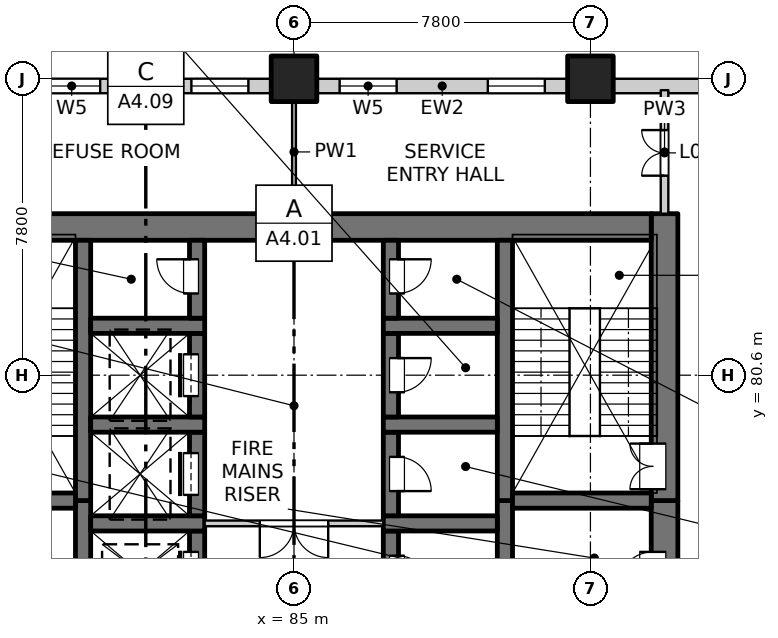
"""IFC4 building model, lengths in metres.
Left out: names, types, materials, properties, quantities, classifications, styles, units other than length and angle.
Written with IfcOpenShell. Run it as: python <this file> out.ifc"""

import sys

from ifc_helpers import new_model, si_unit, direction, frame, frame_2d, origin, origin_2d, place, context, subcontext, project, spatial, rectangle, extrude, element, fill, save


model = new_model("IFC4")
c1 = context("Model", 3, precision=1e-05, world=origin(), true_north=direction((0.0, 1.0)))
c2 = subcontext(c1, "Body", "Model", "MODEL_VIEW")
j1 = project(units=[si_unit("LENGTHUNIT", "METRE"), si_unit("PLANEANGLEUNIT", "RADIAN")], contexts=[c1])
p1 = place(None, origin())
s1 = spatial("IfcSite", under=j1, at=p1, CompositionType="ELEMENT")
p2 = place(p1, origin())
s2 = spatial("IfcBuilding", under=s1, at=p2, CompositionType="ELEMENT")
p3 = place(p2, frame((0.0, 0.0, 6.0)))
s3 = spatial("IfcBuildingStorey", under=s2, at=p3, CompositionType="ELEMENT", Elevation=6.0)
for number, where, z_axis, x_axis in (
    (1, (85.0, 88.4, -0.3), (0.0, 0.0, 1.0), (1.0, 0.0, 0.0)),
    (2, (92.8, 88.4, -0.3), (0.0, 0.0, 1.0), (1.0, 0.0, 0.0)),
):
    element("IfcColumn", number, at=place(p3, frame(where, z_axis=z_axis, x_axis=x_axis)), inside=s3, PredefinedType="COLUMN", context=c2, shape_type="SweptSolid", body=[
        extrude(rectangle(XDim=1.2, YDim=1.2, at=origin_2d()), origin(), (0.0, 0.0, 1.0), 4.5),
    ])
p4 = place(p3, frame((94.75, 61.95, -0.3), z_axis=(0.0, 0.0, 1.0), x_axis=(0.0, 1.0, 0.0)))
e3 = element("IfcWall", 3, at=p4, inside=s3, PredefinedType="SOLIDWALL", context=c2, shape_type="SweptSolid", body=[
    extrude(rectangle(XDim=15.35, YDim=0.7, at=frame_2d((7.675, 0.0))), origin(), (0.0, 0.0, 1.0), 4.5),
])
p5 = place(p4, frame((0.925, 0.0, 0.3)))
e4 = element("IfcOpeningElement", 4, at=p5, cuts=e3, PredefinedType="OPENING", context=c2, shape_type="SweptSolid", body=[
    extrude(rectangle(XDim=0.9, YDim=2.1, at=frame_2d((0.45, 1.05))), frame((0.0, 0.36, 0.0), z_axis=(0.0, -1.0, 0.0), x_axis=(1.0, 0.0, 0.0)), (0.0, 0.0, 1.0), 0.72),
])
p6 = place(p4, frame((6.8, 0.0, 0.3)))
e5 = element("IfcOpeningElement", 5, at=p6, cuts=e3, PredefinedType="OPENING", context=c2, shape_type="SweptSolid", body=[
    extrude(rectangle(XDim=0.9, YDim=2.1, at=frame_2d((0.45, 1.05))), frame((0.0, 0.36, 0.0), z_axis=(0.0, -1.0, 0.0), x_axis=(1.0, 0.0, 0.0)), (0.0, 0.0, 1.0), 0.72),
])
p7 = place(p4, frame((13.1, 0.0, 0.3)))
e6 = element("IfcOpeningElement", 6, at=p7, cuts=e3, PredefinedType="OPENING", context=c2, shape_type="SweptSolid", body=[
    extrude(rectangle(XDim=0.9, YDim=2.1, at=frame_2d((0.45, 1.05))), frame((0.0, 0.36, 0.0), z_axis=(0.0, -1.0, 0.0), x_axis=(1.0, 0.0, 0.0)), (0.0, 0.0, 1.0), 0.72),
])
p8 = place(p3, frame((94.75, 77.3, -0.3), z_axis=(0.0, 0.0, 1.0), x_axis=(0.0, 1.0, 0.0)))
e7 = element("IfcWall", 7, at=p8, inside=s3, PredefinedType="SOLIDWALL", context=c2, shape_type="SweptSolid", body=[
    extrude(rectangle(XDim=7.55, YDim=0.7, at=frame_2d((3.775, 0.0))), origin(), (0.0, 0.0, 1.0), 4.5),
])
p9 = place(p8, frame((0.3, 0.0, 0.3)))
e8 = element("IfcOpeningElement", 8, at=p9, cuts=e7, PredefinedType="OPENING", context=c2, shape_type="SweptSolid", body=[
    extrude(rectangle(XDim=1.2, YDim=2.1, at=frame_2d((0.6, 1.05))), frame((0.0, 0.36, 0.0), z_axis=(0.0, -1.0, 0.0), x_axis=(1.0, 0.0, 0.0)), (0.0, 0.0, 1.0), 0.72),
])
p10 = place(p3, frame((75.6, 84.5, -0.3), z_axis=(0.0, 0.0, 1.0), x_axis=(1.0, 0.0, 0.0)))
e9 = element("IfcWall", 9, at=p10, inside=s3, PredefinedType="SOLIDWALL", context=c2, shape_type="SweptSolid", body=[
    extrude(rectangle(XDim=18.8, YDim=0.7, at=frame_2d((9.4, 0.0))), origin(), (0.0, 0.0, 1.0), 4.5),
])
p11 = place(p3, frame((79.45, 60.9, -0.3), z_axis=(0.0, 0.0, 1.0), x_axis=(0.0, 1.0, 0.0)))
e10 = element("IfcWall", 10, at=p11, inside=s3, PredefinedType="SOLIDWALL", context=c2, shape_type="SweptSolid", body=[
    extrude(rectangle(XDim=16.4, YDim=0.4, at=frame_2d((8.2, 0.0))), origin(), (0.0, 0.0, 1.0), 4.5),
])
p12 = place(p3, frame((79.45, 77.3, -0.3), z_axis=(0.0, 0.0, 1.0), x_axis=(0.0, 1.0, 0.0)))
e11 = element("IfcWall", 11, at=p12, inside=s3, PredefinedType="SOLIDWALL", context=c2, shape_type="SweptSolid", body=[
    extrude(rectangle(XDim=6.85, YDim=0.4, at=frame_2d((3.425, 0.0))), origin(), (0.0, 0.0, 1.0), 4.5),
])
p13 = place(p3, frame((90.55, 61.95, -0.3), z_axis=(0.0, 0.0, 1.0), x_axis=(0.0, 1.0, 0.0)))
e12 = element("IfcWall", 12, at=p13, inside=s3, PredefinedType="SOLIDWALL", context=c2, shape_type="SweptSolid", body=[
    extrude(rectangle(XDim=15.35, YDim=0.4, at=frame_2d((7.675, 0.0))), origin(), (0.0, 0.0, 1.0), 4.5),
])
p14 = place(p3, frame((90.55, 77.3, -0.3), z_axis=(0.0, 0.0, 1.0), x_axis=(0.0, 1.0, 0.0)))
e13 = element("IfcWall", 13, at=p14, inside=s3, PredefinedType="SOLIDWALL", context=c2, shape_type="SweptSolid", body=[
    extrude(rectangle(XDim=6.85, YDim=0.4, at=frame_2d((3.425, 0.0))), origin(), (0.0, 0.0, 1.0), 4.5),
])
p15 = place(p3, frame((82.45, 74.3, -0.3), z_axis=(0.0, 0.0, 1.0), x_axis=(0.0, 1.0, 0.0)))
e14 = element("IfcWall", 14, at=p15, inside=s3, PredefinedType="SOLIDWALL", context=c2, shape_type="SweptSolid", body=[
    extrude(rectangle(XDim=2.2, YDim=0.4, at=frame_2d((1.1, 0.0))), origin(), (0.0, 0.0, 1.0), 4.5),
])
p16 = place(p15, frame((0.55, 0.0, 0.3)))
e15 = element("IfcOpeningElement", 15, at=p16, cuts=e14, PredefinedType="OPENING", context=c2, shape_type="SweptSolid", body=[
    extrude(rectangle(XDim=1.1, YDim=2.1, at=frame_2d((0.55, 1.05))), frame((0.0, 0.21, 0.0), z_axis=(0.0, -1.0, 0.0), x_axis=(1.0, 0.0, 0.0)), (0.0, 0.0, 1.0), 0.42),
])
p17 = place(p3, frame((79.65, 76.7, -0.3), z_axis=(0.0, 0.0, 1.0), x_axis=(1.0, 0.0, 0.0)))
e16 = element("IfcWall", 16, at=p17, inside=s3, PredefinedType="SOLIDWALL", context=c2, shape_type="SweptSolid", body=[
    extrude(rectangle(XDim=3.0, YDim=0.4, at=frame_2d((1.5, 0.0))), origin(), (0.0, 0.0, 1.0), 4.5),
])
p18 = place(p3, frame((82.45, 76.9, -0.3), z_axis=(0.0, 0.0, 1.0), x_axis=(0.0, 1.0, 0.0)))
e17 = element("IfcWall", 17, at=p18, inside=s3, PredefinedType="SOLIDWALL", context=c2, shape_type="SweptSolid", body=[
    extrude(rectangle(XDim=2.2, YDim=0.4, at=frame_2d((1.1, 0.0))), origin(), (0.0, 0.0, 1.0), 4.5),
])
p19 = place(p18, frame((0.55, 0.0, 0.3)))
e18 = element("IfcOpeningElement", 18, at=p19, cuts=e17, PredefinedType="OPENING", context=c2, shape_type="SweptSolid", body=[
    extrude(rectangle(XDim=1.1, YDim=2.1, at=frame_2d((0.55, 1.05))), frame((0.0, 0.21, 0.0), z_axis=(0.0, -1.0, 0.0), x_axis=(1.0, 0.0, 0.0)), (0.0, 0.0, 1.0), 0.42),
])
p20 = place(p3, frame((79.65, 79.3, -0.3), z_axis=(0.0, 0.0, 1.0), x_axis=(1.0, 0.0, 0.0)))
e19 = element("IfcWall", 19, at=p20, inside=s3, PredefinedType="SOLIDWALL", context=c2, shape_type="SweptSolid", body=[
    extrude(rectangle(XDim=3.0, YDim=0.4, at=frame_2d((1.5, 0.0))), origin(), (0.0, 0.0, 1.0), 4.5),
])
p21 = place(p3, frame((82.45, 79.5, -0.3), z_axis=(0.0, 0.0, 1.0), x_axis=(0.0, 1.0, 0.0)))
e20 = element("IfcWall", 20, at=p21, inside=s3, PredefinedType="SOLIDWALL", context=c2, shape_type="SweptSolid", body=[
    extrude(rectangle(XDim=2.2, YDim=0.4, at=frame_2d((1.1, 0.0))), origin(), (0.0, 0.0, 1.0), 4.5),
])
p22 = place(p21, frame((0.55, 0.0, 0.3)))
e21 = element("IfcOpeningElement", 21, at=p22, cuts=e20, PredefinedType="OPENING", context=c2, shape_type="SweptSolid", body=[
    extrude(rectangle(XDim=1.1, YDim=2.1, at=frame_2d((0.55, 1.05))), frame((0.0, 0.21, 0.0), z_axis=(0.0, -1.0, 0.0), x_axis=(1.0, 0.0, 0.0)), (0.0, 0.0, 1.0), 0.42),
])
p23 = place(p3, frame((79.65, 81.9, -0.3), z_axis=(0.0, 0.0, 1.0), x_axis=(1.0, 0.0, 0.0)))
e22 = element("IfcWall", 22, at=p23, inside=s3, PredefinedType="SOLIDWALL", context=c2, shape_type="SweptSolid", body=[
    extrude(rectangle(XDim=3.0, YDim=0.4, at=frame_2d((1.5, 0.0))), origin(), (0.0, 0.0, 1.0), 4.5),
])
p24 = place(p3, frame((82.45, 82.1, -0.3), z_axis=(0.0, 0.0, 1.0), x_axis=(0.0, 1.0, 0.0)))
e23 = element("IfcWall", 23, at=p24, inside=s3, PredefinedType="SOLIDWALL", context=c2, shape_type="SweptSolid", body=[
    extrude(rectangle(XDim=2.05, YDim=0.4, at=frame_2d((1.025, 0.0))), origin(), (0.0, 0.0, 1.0), 4.5),
])
p25 = place(p24, frame((0.65, 0.0, 0.3)))
e24 = element("IfcOpeningElement", 24, at=p25, cuts=e23, PredefinedType="OPENING", context=c2, shape_type="SweptSolid", body=[
    extrude(rectangle(XDim=0.9, YDim=2.1, at=frame_2d((0.45, 1.05))), frame((0.0, 0.21, 0.0), z_axis=(0.0, -1.0, 0.0), x_axis=(1.0, 0.0, 0.0)), (0.0, 0.0, 1.0), 0.42),
])
p26 = place(p3, frame((87.55, 74.3, -0.3), z_axis=(0.0, 0.0, 1.0), x_axis=(0.0, 1.0, 0.0)))
e25 = element("IfcWall", 25, at=p26, inside=s3, PredefinedType="SOLIDWALL", context=c2, shape_type="SweptSolid", body=[
    extrude(rectangle(XDim=2.2, YDim=0.4, at=frame_2d((1.1, 0.0))), origin(), (0.0, 0.0, 1.0), 4.5),
])
p27 = place(p26, frame((0.65, 0.0, 0.3)))
e26 = element("IfcOpeningElement", 26, at=p27, cuts=e25, PredefinedType="OPENING", context=c2, shape_type="SweptSolid", body=[
    extrude(rectangle(XDim=0.9, YDim=2.1, at=frame_2d((0.45, 1.05))), frame((0.0, 0.21, 0.0), z_axis=(0.0, -1.0, 0.0), x_axis=(1.0, 0.0, 0.0)), (0.0, 0.0, 1.0), 0.42),
])
p28 = place(p3, frame((87.35, 76.7, -0.3), z_axis=(0.0, 0.0, 1.0), x_axis=(1.0, 0.0, 0.0)))
e27 = element("IfcWall", 27, at=p28, inside=s3, PredefinedType="SOLIDWALL", context=c2, shape_type="SweptSolid", body=[
    extrude(rectangle(XDim=3.0, YDim=0.4, at=frame_2d((1.5, 0.0))), origin(), (0.0, 0.0, 1.0), 4.5),
])
p29 = place(p3, frame((87.55, 76.9, -0.3), z_axis=(0.0, 0.0, 1.0), x_axis=(0.0, 1.0, 0.0)))
e28 = element("IfcWall", 28, at=p29, inside=s3, PredefinedType="SOLIDWALL", context=c2, shape_type="SweptSolid", body=[
    extrude(rectangle(XDim=2.2, YDim=0.4, at=frame_2d((1.1, 0.0))), origin(), (0.0, 0.0, 1.0), 4.5),
])
p30 = place(p29, frame((0.65, 0.0, 0.3)))
e29 = element("IfcOpeningElement", 29, at=p30, cuts=e28, PredefinedType="OPENING", context=c2, shape_type="SweptSolid", body=[
    extrude(rectangle(XDim=0.9, YDim=2.1, at=frame_2d((0.45, 1.05))), frame((0.0, 0.21, 0.0), z_axis=(0.0, -1.0, 0.0), x_axis=(1.0, 0.0, 0.0)), (0.0, 0.0, 1.0), 0.42),
])
p31 = place(p3, frame((87.35, 79.3, -0.3), z_axis=(0.0, 0.0, 1.0), x_axis=(1.0, 0.0, 0.0)))
e30 = element("IfcWall", 30, at=p31, inside=s3, PredefinedType="SOLIDWALL", context=c2, shape_type="SweptSolid", body=[
    extrude(rectangle(XDim=3.0, YDim=0.4, at=frame_2d((1.5, 0.0))), origin(), (0.0, 0.0, 1.0), 4.5),
])
p32 = place(p3, frame((87.55, 79.5, -0.3), z_axis=(0.0, 0.0, 1.0), x_axis=(0.0, 1.0, 0.0)))
e31 = element("IfcWall", 31, at=p32, inside=s3, PredefinedType="SOLIDWALL", context=c2, shape_type="SweptSolid", body=[
    extrude(rectangle(XDim=2.2, YDim=0.4, at=frame_2d((1.1, 0.0))), origin(), (0.0, 0.0, 1.0), 4.5),
])
p33 = place(p32, frame((0.65, 0.0, 0.3)))
e32 = element("IfcOpeningElement", 32, at=p33, cuts=e31, PredefinedType="OPENING", context=c2, shape_type="SweptSolid", body=[
    extrude(rectangle(XDim=0.9, YDim=2.1, at=frame_2d((0.45, 1.05))), frame((0.0, 0.21, 0.0), z_axis=(0.0, -1.0, 0.0), x_axis=(1.0, 0.0, 0.0)), (0.0, 0.0, 1.0), 0.42),
])
p34 = place(p3, frame((87.35, 81.9, -0.3), z_axis=(0.0, 0.0, 1.0), x_axis=(1.0, 0.0, 0.0)))
e33 = element("IfcWall", 33, at=p34, inside=s3, PredefinedType="SOLIDWALL", context=c2, shape_type="SweptSolid", body=[
    extrude(rectangle(XDim=3.0, YDim=0.4, at=frame_2d((1.5, 0.0))), origin(), (0.0, 0.0, 1.0), 4.5),
])
p35 = place(p3, frame((87.55, 82.1, -0.3), z_axis=(0.0, 0.0, 1.0), x_axis=(0.0, 1.0, 0.0)))
e34 = element("IfcWall", 34, at=p35, inside=s3, PredefinedType="SOLIDWALL", context=c2, shape_type="SweptSolid", body=[
    extrude(rectangle(XDim=2.05, YDim=0.4, at=frame_2d((1.025, 0.0))), origin(), (0.0, 0.0, 1.0), 4.5),
])
p36 = place(p35, frame((0.65, 0.0, 0.3)))
e35 = element("IfcOpeningElement", 35, at=p36, cuts=e34, PredefinedType="OPENING", context=c2, shape_type="SweptSolid", body=[
    extrude(rectangle(XDim=0.9, YDim=2.1, at=frame_2d((0.45, 1.05))), frame((0.0, 0.21, 0.0), z_axis=(0.0, -1.0, 0.0), x_axis=(1.0, 0.0, 0.0)), (0.0, 0.0, 1.0), 0.42),
])
for number, where, z_axis, x_axis in (
    (36, (75.6, 77.3, -0.3), (0.0, 0.0, 1.0), (1.0, 0.0, 0.0)),
    (37, (90.75, 77.3, -0.3), (0.0, 0.0, 1.0), (1.0, 0.0, 0.0)),
):
    element("IfcWall", number, at=place(p3, frame(where, z_axis=z_axis, x_axis=x_axis)), inside=s3, PredefinedType="SOLIDWALL", context=c2, shape_type="SweptSolid", body=[
        extrude(rectangle(XDim=3.65, YDim=0.4, at=frame_2d((1.825, 0.0))), origin(), (0.0, 0.0, 1.0), 4.5),
    ])
p37 = place(p3, frame((77.8, 88.21, 0.0), z_axis=(0.0, 0.0, 1.0), x_axis=(1.0, 0.0, 0.0)))
e38 = element("IfcWall", 38, at=p37, inside=s3, PredefinedType="SOLIDWALL", context=c2, shape_type="SweptSolid", body=[
    extrude(rectangle(XDim=6.6, YDim=0.38, at=frame_2d((3.3, 0.0))), origin(), (0.0, 0.0, 1.0), 4.2),
])
p38 = place(p37, frame((0.6, 0.0, 0.9)))
e39 = element("IfcOpeningElement", 39, at=p38, cuts=e38, PredefinedType="OPENING", context=c2, shape_type="SweptSolid", body=[
    extrude(rectangle(XDim=1.5, YDim=1.5, at=frame_2d((0.75, 0.75))), frame((0.0, 0.2, 0.0), z_axis=(0.0, -1.0, 0.0), x_axis=(1.0, 0.0, 0.0)), (0.0, 0.0, 1.0), 0.4),
])
p39 = place(p37, frame((4.5, 0.0, 0.9)))
e40 = element("IfcOpeningElement", 40, at=p39, cuts=e38, PredefinedType="OPENING", context=c2, shape_type="SweptSolid", body=[
    extrude(rectangle(XDim=1.5, YDim=1.5, at=frame_2d((0.75, 0.75))), frame((0.0, 0.2, 0.0), z_axis=(0.0, -1.0, 0.0), x_axis=(1.0, 0.0, 0.0)), (0.0, 0.0, 1.0), 0.4),
])
p40 = place(p3, frame((85.6, 88.21, 0.0), z_axis=(0.0, 0.0, 1.0), x_axis=(1.0, 0.0, 0.0)))
e41 = element("IfcWall", 41, at=p40, inside=s3, PredefinedType="SOLIDWALL", context=c2, shape_type="SweptSolid", body=[
    extrude(rectangle(XDim=6.6, YDim=0.38, at=frame_2d((3.3, 0.0))), origin(), (0.0, 0.0, 1.0), 4.2),
])
p41 = place(p40, frame((0.6, 0.0, 0.9)))
e42 = element("IfcOpeningElement", 42, at=p41, cuts=e41, PredefinedType="OPENING", context=c2, shape_type="SweptSolid", body=[
    extrude(rectangle(XDim=1.5, YDim=1.5, at=frame_2d((0.75, 0.75))), frame((0.0, 0.2, 0.0), z_axis=(0.0, -1.0, 0.0), x_axis=(1.0, 0.0, 0.0)), (0.0, 0.0, 1.0), 0.4),
])
p42 = place(p40, frame((4.5, 0.0, 0.9)))
e43 = element("IfcOpeningElement", 43, at=p42, cuts=e41, PredefinedType="OPENING", context=c2, shape_type="SweptSolid", body=[
    extrude(rectangle(XDim=1.5, YDim=1.5, at=frame_2d((0.75, 0.75))), frame((0.0, 0.2, 0.0), z_axis=(0.0, -1.0, 0.0), x_axis=(1.0, 0.0, 0.0)), (0.0, 0.0, 1.0), 0.4),
])
p43 = place(p3, frame((93.4, 88.21, 0.0), z_axis=(0.0, 0.0, 1.0), x_axis=(1.0, 0.0, 0.0)))
e44 = element("IfcWall", 44, at=p43, inside=s3, PredefinedType="SOLIDWALL", context=c2, shape_type="SweptSolid", body=[
    extrude(rectangle(XDim=6.6, YDim=0.38, at=frame_2d((3.3, 0.0))), origin(), (0.0, 0.0, 1.0), 4.2),
])
p44 = place(p43, frame((4.5, 0.0, 0.9)))
e45 = element("IfcOpeningElement", 45, at=p44, cuts=e44, PredefinedType="OPENING", context=c2, shape_type="SweptSolid", body=[
    extrude(rectangle(XDim=1.5, YDim=1.5, at=frame_2d((0.75, 0.75))), frame((0.0, 0.2, 0.0), z_axis=(0.0, -1.0, 0.0), x_axis=(1.0, 0.0, 0.0)), (0.0, 0.0, 1.0), 0.4),
])
p45 = place(p3, frame((82.65, 76.7, 0.0), z_axis=(0.0, 0.0, 1.0), x_axis=(1.0, 0.0, 0.0)))
e46 = element("IfcWall", 46, at=p45, inside=s3, PredefinedType="PARTITIONING", context=c2, shape_type="SweptSolid", body=[
    extrude(rectangle(XDim=4.7, YDim=0.15, at=frame_2d((2.35, 0.0))), origin(), (0.0, 0.0, 1.0), 4.2),
])
p46 = place(p45, frame((1.45, 0.0, 0.0)))
e47 = element("IfcOpeningElement", 47, at=p46, cuts=e46, PredefinedType="OPENING", context=c2, shape_type="SweptSolid", body=[
    extrude(rectangle(XDim=1.8, YDim=2.1, at=frame_2d((0.9, 1.05))), frame((0.0, 0.085, 0.0), z_axis=(0.0, -1.0, 0.0), x_axis=(1.0, 0.0, 0.0)), (0.0, 0.0, 1.0), 0.17),
])
p47 = place(p3, frame((85.0, 84.85, 0.0), z_axis=(0.0, 0.0, 1.0), x_axis=(0.0, 1.0, 0.0)))
e48 = element("IfcWall", 48, at=p47, inside=s3, PredefinedType="PARTITIONING", context=c2, shape_type="SweptSolid", body=[
    extrude(rectangle(XDim=3.25, YDim=0.1, at=frame_2d((1.625, 0.0))), origin(), (0.0, 0.0, 1.0), 4.2),
])
p48 = place(p3, frame((94.75, 84.85, 0.0), z_axis=(0.0, 0.0, 1.0), x_axis=(0.0, 1.0, 0.0)))
e49 = element("IfcWall", 49, at=p48, inside=s3, PredefinedType="PARTITIONING", context=c2, shape_type="SweptSolid", body=[
    extrude(rectangle(XDim=3.25, YDim=0.2, at=frame_2d((1.625, 0.0))), origin(), (0.0, 0.0, 1.0), 4.2),
])
p49 = place(p48, frame((1.0, 0.0, 0.0)))
e50 = element("IfcOpeningElement", 50, at=p49, cuts=e49, PredefinedType="OPENING", context=c2, shape_type="SweptSolid", body=[
    extrude(rectangle(XDim=1.2, YDim=2.1, at=frame_2d((0.6, 1.05))), frame((0.0, 0.11, 0.0), z_axis=(0.0, -1.0, 0.0), x_axis=(1.0, 0.0, 0.0)), (0.0, 0.0, 1.0), 0.22),
])
p50 = place(p38, origin())
e51 = element("IfcWindow", 51, at=p50, inside=s3, PartitioningType="SINGLE_PANEL", PredefinedType="WINDOW", context=c2, shape_type="SweptSolid", body=[
    extrude(rectangle(XDim=1.5, YDim=1.5, at=frame_2d((0.75, 0.75))), frame((0.0, 0.03, 0.0), z_axis=(0.0, -1.0, 0.0), x_axis=(1.0, 0.0, 0.0)), (0.0, 0.0, 1.0), 0.06),
])
fill(e39, e51)
p51 = place(p39, origin())
e52 = element("IfcWindow", 52, at=p51, inside=s3, PartitioningType="SINGLE_PANEL", PredefinedType="WINDOW", context=c2, shape_type="SweptSolid", body=[
    extrude(rectangle(XDim=1.5, YDim=1.5, at=frame_2d((0.75, 0.75))), frame((0.0, 0.03, 0.0), z_axis=(0.0, -1.0, 0.0), x_axis=(1.0, 0.0, 0.0)), (0.0, 0.0, 1.0), 0.06),
])
fill(e40, e52)
p52 = place(p41, origin())
e53 = element("IfcWindow", 53, at=p52, inside=s3, PartitioningType="SINGLE_PANEL", PredefinedType="WINDOW", context=c2, shape_type="SweptSolid", body=[
    extrude(rectangle(XDim=1.5, YDim=1.5, at=frame_2d((0.75, 0.75))), frame((0.0, 0.03, 0.0), z_axis=(0.0, -1.0, 0.0), x_axis=(1.0, 0.0, 0.0)), (0.0, 0.0, 1.0), 0.06),
])
fill(e42, e53)
p53 = place(p42, origin())
e54 = element("IfcWindow", 54, at=p53, inside=s3, PartitioningType="SINGLE_PANEL", PredefinedType="WINDOW", context=c2, shape_type="SweptSolid", body=[
    extrude(rectangle(XDim=1.5, YDim=1.5, at=frame_2d((0.75, 0.75))), frame((0.0, 0.03, 0.0), z_axis=(0.0, -1.0, 0.0), x_axis=(1.0, 0.0, 0.0)), (0.0, 0.0, 1.0), 0.06),
])
fill(e43, e54)
p54 = place(p16, origin())
e55 = element("IfcDoor", 55, at=p54, inside=s3, OperationType="SLIDING_TO_LEFT", PredefinedType="DOOR", context=c2, shape_type="SweptSolid", body=[
    extrude(rectangle(XDim=1.1, YDim=2.1, at=frame_2d((0.55, 1.05))), frame((0.0, 0.185, 0.0), z_axis=(0.0, -1.0, 0.0), x_axis=(1.0, 0.0, 0.0)), (0.0, 0.0, 1.0), 0.05),
])
fill(e15, e55)
p55 = place(p27, origin())
e56 = element("IfcDoor", 56, at=p55, inside=s3, OperationType="SINGLE_SWING_RIGHT", PredefinedType="DOOR", context=c2, shape_type="SweptSolid", body=[
    extrude(rectangle(XDim=0.9, YDim=2.1, at=frame_2d((0.45, 1.05))), frame((0.0, -0.135, 0.0), z_axis=(0.0, -1.0, 0.0), x_axis=(1.0, 0.0, 0.0)), (0.0, 0.0, 1.0), 0.05),
])
fill(e26, e56)
p56 = place(p7, origin())
e57 = element("IfcDoor", 57, at=p56, inside=s3, OperationType="SINGLE_SWING_LEFT", PredefinedType="DOOR", context=c2, shape_type="SweptSolid", body=[
    extrude(rectangle(XDim=0.9, YDim=2.1, at=frame_2d((0.45, 1.05))), frame((0.0, 0.335, 0.0), z_axis=(0.0, -1.0, 0.0), x_axis=(1.0, 0.0, 0.0)), (0.0, 0.0, 1.0), 0.05),
])
fill(e6, e57)
p57 = place(p46, origin())
e58 = element("IfcDoor", 58, at=p57, inside=s3, OperationType="DOUBLE_DOOR_SINGLE_SWING", PredefinedType="DOOR", context=c2, shape_type="SweptSolid", body=[
    extrude(rectangle(XDim=1.8, YDim=2.1, at=frame_2d((0.9, 1.05))), frame((0.0, 0.025, 0.0), z_axis=(0.0, -1.0, 0.0), x_axis=(1.0, 0.0, 0.0)), (0.0, 0.0, 1.0), 0.05),
])
fill(e47, e58)
p58 = place(p19, origin())
e59 = element("IfcDoor", 59, at=p58, inside=s3, OperationType="SLIDING_TO_LEFT", PredefinedType="DOOR", context=c2, shape_type="SweptSolid", body=[
    extrude(rectangle(XDim=1.1, YDim=2.1, at=frame_2d((0.55, 1.05))), frame((0.0, 0.185, 0.0), z_axis=(0.0, -1.0, 0.0), x_axis=(1.0, 0.0, 0.0)), (0.0, 0.0, 1.0), 0.05),
])
fill(e18, e59)
p59 = place(p30, origin())
e60 = element("IfcDoor", 60, at=p59, inside=s3, OperationType="SINGLE_SWING_RIGHT", PredefinedType="DOOR", context=c2, shape_type="SweptSolid", body=[
    extrude(rectangle(XDim=0.9, YDim=2.1, at=frame_2d((0.45, 1.05))), frame((0.0, -0.135, 0.0), z_axis=(0.0, -1.0, 0.0), x_axis=(1.0, 0.0, 0.0)), (0.0, 0.0, 1.0), 0.05),
])
fill(e29, e60)
p60 = place(p9, origin())
e61 = element("IfcDoor", 61, at=p60, inside=s3, OperationType="DOUBLE_DOOR_SINGLE_SWING", PredefinedType="DOOR", context=c2, shape_type="SweptSolid", body=[
    extrude(rectangle(XDim=1.2, YDim=2.1, at=frame_2d((0.6, 1.05))), frame((0.0, 0.335, 0.0), z_axis=(0.0, -1.0, 0.0), x_axis=(1.0, 0.0, 0.0)), (0.0, 0.0, 1.0), 0.05),
])
fill(e8, e61)
p61 = place(p22, origin())
e62 = element("IfcDoor", 62, at=p61, inside=s3, OperationType="SLIDING_TO_LEFT", PredefinedType="DOOR", context=c2, shape_type="SweptSolid", body=[
    extrude(rectangle(XDim=1.1, YDim=2.1, at=frame_2d((0.55, 1.05))), frame((0.0, 0.185, 0.0), z_axis=(0.0, -1.0, 0.0), x_axis=(1.0, 0.0, 0.0)), (0.0, 0.0, 1.0), 0.05),
])
fill(e21, e62)
p62 = place(p33, origin())
e63 = element("IfcDoor", 63, at=p62, inside=s3, OperationType="SINGLE_SWING_LEFT", PredefinedType="DOOR", context=c2, shape_type="SweptSolid", body=[
    extrude(rectangle(XDim=0.9, YDim=2.1, at=frame_2d((0.45, 1.05))), frame((0.0, -0.135, 0.0), z_axis=(0.0, -1.0, 0.0), x_axis=(1.0, 0.0, 0.0)), (0.0, 0.0, 1.0), 0.05),
])
fill(e32, e63)
p63 = place(p25, origin())
e64 = element("IfcDoor", 64, at=p63, inside=s3, OperationType="SINGLE_SWING_RIGHT", PredefinedType="DOOR", context=c2, shape_type="SweptSolid", body=[
    extrude(rectangle(XDim=0.9, YDim=2.1, at=frame_2d((0.45, 1.05))), frame((0.0, 0.185, 0.0), z_axis=(0.0, -1.0, 0.0), x_axis=(1.0, 0.0, 0.0)), (0.0, 0.0, 1.0), 0.05),
])
fill(e24, e64)
p64 = place(p36, origin())
e65 = element("IfcDoor", 65, at=p64, inside=s3, OperationType="SINGLE_SWING_LEFT", PredefinedType="DOOR", context=c2, shape_type="SweptSolid", body=[
    extrude(rectangle(XDim=0.9, YDim=2.1, at=frame_2d((0.45, 1.05))), frame((0.0, -0.135, 0.0), z_axis=(0.0, -1.0, 0.0), x_axis=(1.0, 0.0, 0.0)), (0.0, 0.0, 1.0), 0.05),
])
fill(e35, e65)
p65 = place(p49, origin())
e66 = element("IfcDoor", 66, at=p65, inside=s3, OperationType="DOUBLE_DOOR_SINGLE_SWING", PredefinedType="DOOR", context=c2, shape_type="SweptSolid", body=[
    extrude(rectangle(XDim=1.2, YDim=2.1, at=frame_2d((0.6, 1.05))), frame((0.0, 0.025, 0.0), z_axis=(0.0, -1.0, 0.0), x_axis=(1.0, 0.0, 0.0)), (0.0, 0.0, 1.0), 0.05),
])
fill(e50, e66)
save(model, sys.argv[1])
